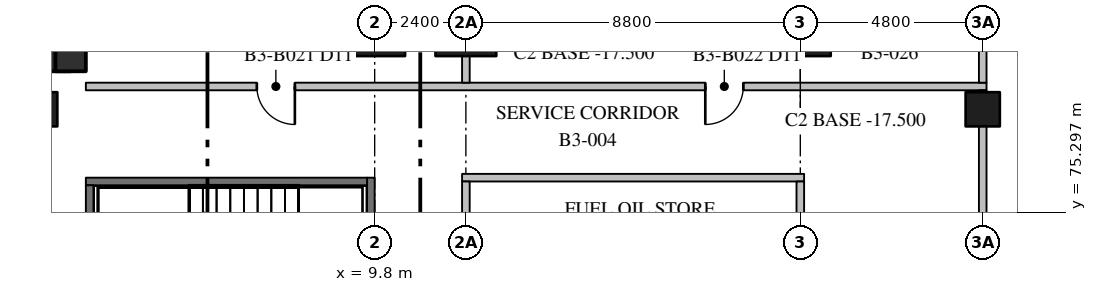
"""IFC4 building model, lengths in metres.
Left out: names, types, materials, properties, quantities, classifications, styles, units other than length and angle.
Written with IfcOpenShell. Run it as: python <this file> out.ifc"""

import sys

from ifc_helpers import new_model, si_unit, direction, frame, frame_2d, origin, origin_2d, place, context, subcontext, project, spatial, rectangle, extrude, element, fill, save


model = new_model("IFC4")
c1 = context("Model", 3, precision=1e-05, world=origin(), true_north=direction((0.0, 1.0)))
c2 = subcontext(c1, "Body", "Model", "MODEL_VIEW")
j1 = project(units=[si_unit("LENGTHUNIT", "METRE"), si_unit("PLANEANGLEUNIT", "RADIAN")], contexts=[c1])
p1 = place(None, origin())
s1 = spatial("IfcSite", under=j1, at=p1, CompositionType="ELEMENT")
p2 = place(p1, origin())
s2 = spatial("IfcBuilding", under=s1, at=p2, CompositionType="ELEMENT")
p3 = place(p2, frame((0.0, 0.0, -17.0)))
s3 = spatial("IfcBuildingStorey", under=s2, at=p3, CompositionType="ELEMENT", Elevation=-17.0)
for number, where, z_axis, x_axis in (
    (1, (9.8, 80.2, -0.5), (0.0, 0.0, 1.0), (1.0, 0.0, 0.0)),
    (2, (12.2, 80.2, -0.5), (0.0, 0.0, 1.0), (1.0, 0.0, 0.0)),
    (3, (21.0, 80.2, -0.5), (0.0, 0.0, 1.0), (1.0, 0.0, 0.0)),
):
    element("IfcColumn", number, at=place(p3, frame(where, z_axis=z_axis, x_axis=x_axis)), inside=s3, PredefinedType="COLUMN", context=c2, shape_type="SweptSolid", body=[
        extrude(rectangle(XDim=1.6, YDim=1.6, at=origin_2d()), origin(), (0.0, 0.0, 1.0), 5.5),
    ])
for number, where, z_axis, x_axis in (
    (4, (1.0, 78.0, -0.5), (0.0, 0.0, 1.0), (1.0, 0.0, 0.0)),
    (5, (25.8, 78.0, -0.5), (0.0, 0.0, 1.0), (1.0, 0.0, 0.0)),
):
    element("IfcColumn", number, at=place(p3, frame(where, z_axis=z_axis, x_axis=x_axis)), inside=s3, PredefinedType="COLUMN", context=c2, shape_type="SweptSolid", body=[
        extrude(rectangle(XDim=0.9, YDim=0.9, at=origin_2d()), origin(), (0.0, 0.0, 1.0), 5.5),
    ])
for number, where, z_axis, x_axis in (
    (6, (-0.8, 79.4, -0.5), (0.0, 0.0, 1.0), (1.0, 0.0, 0.0)),
    (7, (1.8, 79.0, -0.5), (0.0, 0.0, 1.0), (0.0, 1.0, 0.0)),
):
    element("IfcWall", number, at=place(p3, frame(where, z_axis=z_axis, x_axis=x_axis)), inside=s3, PredefinedType="SHEAR", context=c2, shape_type="SweptSolid", body=[
        extrude(rectangle(XDim=2.6, YDim=0.8, at=frame_2d((1.3, 0.0))), origin(), (0.0, 0.0, 1.0), 5.5),
    ])
p4 = place(p3, frame((9.7, 71.8, 0.0), z_axis=(0.0, 0.0, 1.0), x_axis=(0.0, 1.0, 0.0)))
e8 = element("IfcWall", 8, at=p4, inside=s3, PredefinedType="SHEAR", context=c2, shape_type="SweptSolid", body=[
    extrude(rectangle(XDim=4.4, YDim=0.2, at=frame_2d((2.2, 0.0))), origin(), (0.0, 0.0, 1.0), 4.6),
])
p5 = place(p4, frame((1.6, 0.0, 0.0)))
e9 = element("IfcOpeningElement", 9, at=p5, cuts=e8, PredefinedType="OPENING", context=c2, shape_type="SweptSolid", body=[
    extrude(rectangle(XDim=1.2, YDim=2.1, at=frame_2d((0.6, 1.05))), frame((0.0, 0.11, 0.0), z_axis=(0.0, -1.0, 0.0), x_axis=(1.0, 0.0, 0.0)), (0.0, 0.0, 1.0), 0.22),
])
p6 = place(p3, frame((2.2, 76.1, 0.0), z_axis=(0.0, 0.0, 1.0), x_axis=(1.0, 0.0, 0.0)))
e10 = element("IfcWall", 10, at=p6, inside=s3, PredefinedType="SHEAR", context=c2, shape_type="SweptSolid", body=[
    extrude(rectangle(XDim=7.4, YDim=0.2, at=frame_2d((3.7, 0.0))), origin(), (0.0, 0.0, 1.0), 4.6),
])
p7 = place(p3, frame((2.3, 72.0, 0.0), z_axis=(0.0, 0.0, 1.0), x_axis=(0.0, 1.0, 0.0)))
e11 = element("IfcWall", 11, at=p7, inside=s3, PredefinedType="SHEAR", context=c2, shape_type="SweptSolid", body=[
    extrude(rectangle(XDim=4.0, YDim=0.2, at=frame_2d((2.0, 0.0))), origin(), (0.0, 0.0, 1.0), 4.6),
])
p8 = place(p3, frame((12.1, 76.2, 0.0), z_axis=(0.0, 0.0, 1.0), x_axis=(1.0, 0.0, 0.0)))
e12 = element("IfcWall", 12, at=p8, inside=s3, PredefinedType="PARTITIONING", context=c2, shape_type="SweptSolid", body=[
    extrude(rectangle(XDim=9.0, YDim=0.2, at=frame_2d((4.5, 0.0))), origin(), (0.0, 0.0, 1.0), 4.6),
])
p9 = place(p3, frame((2.2, 78.6, 0.0), z_axis=(0.0, 0.0, 1.0), x_axis=(1.0, 0.0, 0.0)))
e13 = element("IfcWall", 13, at=p9, inside=s3, PredefinedType="PARTITIONING", context=c2, shape_type="SweptSolid", body=[
    extrude(rectangle(XDim=23.7, YDim=0.2, at=frame_2d((11.85, 0.0))), origin(), (0.0, 0.0, 1.0), 4.6),
])
p10 = place(p9, frame((4.5, 0.0, 0.0)))
e14 = element("IfcOpeningElement", 14, at=p10, cuts=e13, PredefinedType="OPENING", context=c2, shape_type="SweptSolid", body=[
    extrude(rectangle(XDim=1.0, YDim=2.1, at=frame_2d((0.5, 1.05))), frame((0.0, 0.11, 0.0), z_axis=(0.0, -1.0, 0.0), x_axis=(1.0, 0.0, 0.0)), (0.0, 0.0, 1.0), 0.22),
])
p11 = place(p9, frame((16.3, 0.0, 0.0)))
e15 = element("IfcOpeningElement", 15, at=p11, cuts=e13, PredefinedType="OPENING", context=c2, shape_type="SweptSolid", body=[
    extrude(rectangle(XDim=1.0, YDim=2.1, at=frame_2d((0.5, 1.05))), frame((0.0, 0.11, 0.0), z_axis=(0.0, -1.0, 0.0), x_axis=(1.0, 0.0, 0.0)), (0.0, 0.0, 1.0), 0.22),
])
p12 = place(p3, frame((12.2, 12.3, 0.0), z_axis=(0.0, 0.0, 1.0), x_axis=(0.0, 1.0, 0.0)))
e16 = element("IfcWall", 16, at=p12, inside=s3, PredefinedType="PARTITIONING", context=c2, shape_type="SweptSolid", body=[
    extrude(rectangle(XDim=63.8, YDim=0.2, at=frame_2d((31.9, 0.0))), origin(), (0.0, 0.0, 1.0), 4.6),
])
p13 = place(p12, frame((4.2, 0.0, 0.0)))
e17 = element("IfcOpeningElement", 17, at=p13, cuts=e16, PredefinedType="OPENING", context=c2, shape_type="SweptSolid", body=[
    extrude(rectangle(XDim=1.0, YDim=2.1, at=frame_2d((0.5, 1.05))), frame((0.0, 0.11, 0.0), z_axis=(0.0, -1.0, 0.0), x_axis=(1.0, 0.0, 0.0)), (0.0, 0.0, 1.0), 0.22),
])
p14 = place(p12, frame((11.6, 0.0, 0.0)))
e18 = element("IfcOpeningElement", 18, at=p14, cuts=e16, PredefinedType="OPENING", context=c2, shape_type="SweptSolid", body=[
    extrude(rectangle(XDim=1.0, YDim=2.1, at=frame_2d((0.5, 1.05))), frame((0.0, 0.11, 0.0), z_axis=(0.0, -1.0, 0.0), x_axis=(1.0, 0.0, 0.0)), (0.0, 0.0, 1.0), 0.22),
])
p15 = place(p12, frame((19.3, 0.0, 0.0)))
e19 = element("IfcOpeningElement", 19, at=p15, cuts=e16, PredefinedType="OPENING", context=c2, shape_type="SweptSolid", body=[
    extrude(rectangle(XDim=1.0, YDim=2.1, at=frame_2d((0.5, 1.05))), frame((0.0, 0.11, 0.0), z_axis=(0.0, -1.0, 0.0), x_axis=(1.0, 0.0, 0.0)), (0.0, 0.0, 1.0), 0.22),
])
p16 = place(p12, frame((28.0, 0.0, 0.0)))
e20 = element("IfcOpeningElement", 20, at=p16, cuts=e16, PredefinedType="OPENING", context=c2, shape_type="SweptSolid", body=[
    extrude(rectangle(XDim=1.0, YDim=2.1, at=frame_2d((0.5, 1.05))), frame((0.0, 0.11, 0.0), z_axis=(0.0, -1.0, 0.0), x_axis=(1.0, 0.0, 0.0)), (0.0, 0.0, 1.0), 0.22),
])
p17 = place(p12, frame((36.9, 0.0, 0.0)))
e21 = element("IfcOpeningElement", 21, at=p17, cuts=e16, PredefinedType="OPENING", context=c2, shape_type="SweptSolid", body=[
    extrude(rectangle(XDim=1.0, YDim=2.1, at=frame_2d((0.5, 1.05))), frame((0.0, 0.11, 0.0), z_axis=(0.0, -1.0, 0.0), x_axis=(1.0, 0.0, 0.0)), (0.0, 0.0, 1.0), 0.22),
])
p18 = place(p12, frame((46.0, 0.0, 0.0)))
e22 = element("IfcOpeningElement", 22, at=p18, cuts=e16, PredefinedType="OPENING", context=c2, shape_type="SweptSolid", body=[
    extrude(rectangle(XDim=1.0, YDim=2.1, at=frame_2d((0.5, 1.05))), frame((0.0, 0.11, 0.0), z_axis=(0.0, -1.0, 0.0), x_axis=(1.0, 0.0, 0.0)), (0.0, 0.0, 1.0), 0.22),
])
p19 = place(p12, frame((54.2, 0.0, 0.0)))
e23 = element("IfcOpeningElement", 23, at=p19, cuts=e16, PredefinedType="OPENING", context=c2, shape_type="SweptSolid", body=[
    extrude(rectangle(XDim=1.0, YDim=2.1, at=frame_2d((0.5, 1.05))), frame((0.0, 0.11, 0.0), z_axis=(0.0, -1.0, 0.0), x_axis=(1.0, 0.0, 0.0)), (0.0, 0.0, 1.0), 0.22),
])
p20 = place(p12, frame((61.0, 0.0, 0.0)))
e24 = element("IfcOpeningElement", 24, at=p20, cuts=e16, PredefinedType="OPENING", context=c2, shape_type="SweptSolid", body=[
    extrude(rectangle(XDim=1.0, YDim=2.1, at=frame_2d((0.5, 1.05))), frame((0.0, 0.11, 0.0), z_axis=(0.0, -1.0, 0.0), x_axis=(1.0, 0.0, 0.0)), (0.0, 0.0, 1.0), 0.22),
])
p21 = place(p3, frame((12.2, 78.7, 0.0), z_axis=(0.0, 0.0, 1.0), x_axis=(0.0, 1.0, 0.0)))
e25 = element("IfcWall", 25, at=p21, inside=s3, PredefinedType="PARTITIONING", context=c2, shape_type="SweptSolid", body=[
    extrude(rectangle(XDim=2.5, YDim=0.2, at=frame_2d((1.25, 0.0))), origin(), (0.0, 0.0, 1.0), 4.6),
])
p22 = place(p3, frame((21.0, 12.3, 0.0), z_axis=(0.0, 0.0, 1.0), x_axis=(0.0, 1.0, 0.0)))
e26 = element("IfcWall", 26, at=p22, inside=s3, PredefinedType="PARTITIONING", context=c2, shape_type="SweptSolid", body=[
    extrude(rectangle(XDim=63.8, YDim=0.2, at=frame_2d((31.9, 0.0))), origin(), (0.0, 0.0, 1.0), 4.6),
])
p23 = place(p3, frame((25.8, 12.3, 0.0), z_axis=(0.0, 0.0, 1.0), x_axis=(0.0, 1.0, 0.0)))
e27 = element("IfcWall", 27, at=p23, inside=s3, PredefinedType="PARTITIONING", context=c2, shape_type="SweptSolid", body=[
    extrude(rectangle(XDim=66.2, YDim=0.2, at=frame_2d((33.1, 0.0))), origin(), (0.0, 0.0, 1.0), 4.6),
])
p24 = place(p23, frame((18.6, 0.0, 0.0)))
e28 = element("IfcOpeningElement", 28, at=p24, cuts=e27, PredefinedType="OPENING", context=c2, shape_type="SweptSolid", body=[
    extrude(rectangle(XDim=1.8, YDim=2.1, at=frame_2d((0.9, 1.05))), frame((0.0, 0.11, 0.0), z_axis=(0.0, -1.0, 0.0), x_axis=(1.0, 0.0, 0.0)), (0.0, 0.0, 1.0), 0.22),
])
p25 = place(p3, frame((25.8, 78.7, 0.0), z_axis=(0.0, 0.0, 1.0), x_axis=(0.0, 1.0, 0.0)))
e29 = element("IfcWall", 29, at=p25, inside=s3, PredefinedType="PARTITIONING", context=c2, shape_type="SweptSolid", body=[
    extrude(rectangle(XDim=2.5, YDim=0.2, at=frame_2d((1.25, 0.0))), origin(), (0.0, 0.0, 1.0), 4.6),
])
p26 = place(p10, frame((1.0, 0.0, 0.0), z_axis=(0.0, 0.0, 1.0), x_axis=(-1.0, 0.0, 0.0)))
e30 = element("IfcDoor", 30, at=p26, inside=s3, OperationType="SINGLE_SWING_RIGHT", PredefinedType="DOOR", context=c2, shape_type="SweptSolid", body=[
    extrude(rectangle(XDim=1.0, YDim=2.1, at=frame_2d((0.5, 1.05))), frame((0.0, 0.025, 0.0), z_axis=(0.0, -1.0, 0.0), x_axis=(1.0, 0.0, 0.0)), (0.0, 0.0, 1.0), 0.05),
])
fill(e14, e30)
p27 = place(p11, frame((1.0, 0.0, 0.0), z_axis=(0.0, 0.0, 1.0), x_axis=(-1.0, 0.0, 0.0)))
e31 = element("IfcDoor", 31, at=p27, inside=s3, OperationType="SINGLE_SWING_LEFT", PredefinedType="DOOR", context=c2, shape_type="SweptSolid", body=[
    extrude(rectangle(XDim=1.0, YDim=2.1, at=frame_2d((0.5, 1.05))), frame((0.0, 0.025, 0.0), z_axis=(0.0, -1.0, 0.0), x_axis=(1.0, 0.0, 0.0)), (0.0, 0.0, 1.0), 0.05),
])
fill(e15, e31)
save(model, sys.argv[1])
